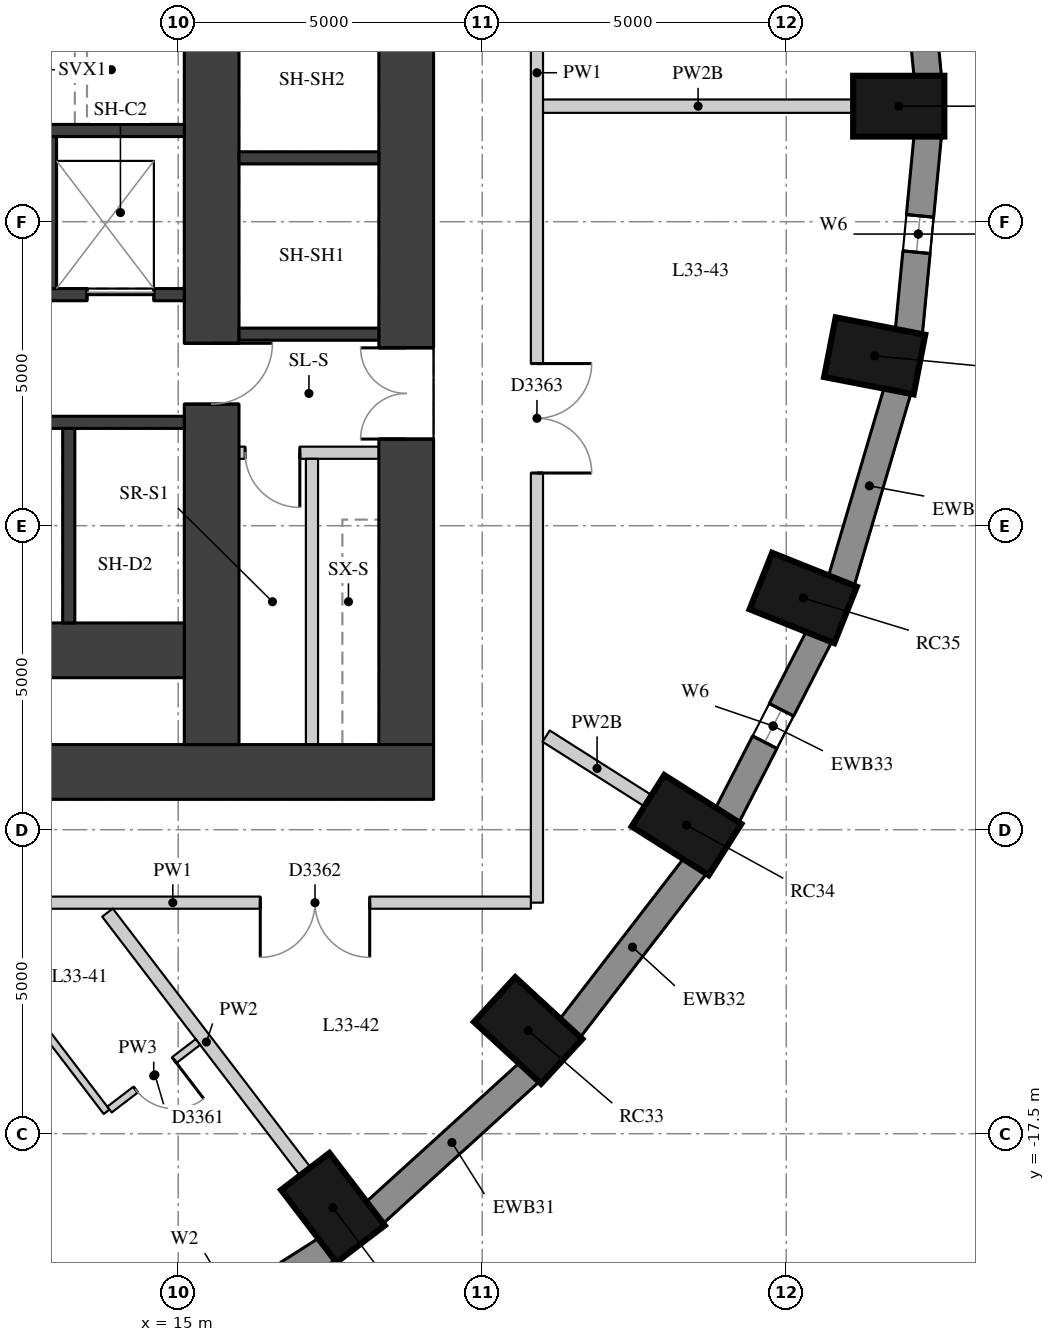
"""IFC4 building model, lengths in metres.
Left out: names, types, materials, properties, quantities, classifications, styles, units other than length and angle.
Written with IfcOpenShell. Run it as: python <this file> out.ifc"""

import sys

from ifc_helpers import new_model, si_unit, direction, frame, frame_2d, origin, origin_2d, place, context, subcontext, project, spatial, rectangle, extrude, element, fill, save


model = new_model("IFC4")
c1 = context("Model", 3, precision=1e-05, world=origin(), true_north=direction((0.0, 1.0)))
c2 = subcontext(c1, "Body", "Model", "MODEL_VIEW")
j1 = project(units=[si_unit("LENGTHUNIT", "METRE"), si_unit("PLANEANGLEUNIT", "RADIAN")], contexts=[c1])
p1 = place(None, origin())
s1 = spatial("IfcSite", under=j1, at=p1, CompositionType="ELEMENT")
p2 = place(p1, origin())
s2 = spatial("IfcBuilding", under=s1, at=p2, CompositionType="ELEMENT")
p3 = place(p2, frame((0.0, 0.0, 118.6)))
s3 = spatial("IfcBuildingStorey", under=s2, at=p3, CompositionType="ELEMENT", Elevation=118.6)
for number, where, z_axis, x_axis in (
    (1, (26.85, -0.6, 0.0), (0.0, 0.0, 1.0), (1.0, 0.0, 0.0)),
    (2, (17.545, -18.717, 0.0), (0.0, 0.0, 1.0), (0.607, -0.795, 0.0)),
    (3, (20.755, -15.802, 0.0), (0.0, 0.0, 1.0), (0.735, -0.678, 0.0)),
    (4, (23.36, -12.425, 0.0), (0.0, 0.0, 1.0), (0.845, -0.536, 0.0)),
    (5, (25.279, -8.689, 0.0), (0.0, 0.0, 1.0), (0.929, -0.371, 0.0)),
    (6, (26.454, -4.707, 0.0), (0.0, 0.0, 1.0), (0.982, -0.19, 0.0)),
):
    element("IfcColumn", number, at=place(p3, frame(where, z_axis=z_axis, x_axis=x_axis)), inside=s3, PredefinedType="COLUMN", context=c2, shape_type="SweptSolid", body=[
        extrude(rectangle(XDim=1.5, YDim=1.0, at=origin_2d()), origin(), (0.0, 0.0, 1.0), 3.3),
    ])
p4 = place(p3, frame((27.328, -0.12, 0.0), z_axis=(0.0, 0.0, 1.0), x_axis=(-0.09589355735, 0.995391594127, 0.0)))
e7 = element("IfcWall", 7, at=p4, inside=s3, PredefinedType="SOLIDWALL", context=c2, shape_type="SweptSolid", body=[
    extrude(rectangle(XDim=3.261, YDim=0.45, at=frame_2d((1.631, 0.0))), origin(), (0.0, 0.0, 1.0), 3.02),
])
p5 = place(p3, frame((14.475, -21.287, 0.0), z_axis=(0.0, 0.0, 1.0), x_axis=(0.843911841423, 0.536481876587, 0.0)))
e8 = element("IfcWall", 8, at=p5, inside=s3, PredefinedType="SOLIDWALL", context=c2, shape_type="SweptSolid", body=[
    extrude(rectangle(XDim=3.532, YDim=0.45, at=frame_2d((1.766, 0.0))), origin(), (0.0, 0.0, 1.0), 3.02),
])
p6 = place(p5, frame((0.766, 0.0, 0.4)))
e9 = element("IfcOpeningElement", 9, at=p6, cuts=e8, PredefinedType="OPENING", context=c2, shape_type="SweptSolid", body=[
    extrude(rectangle(XDim=2.0, YDim=1.75, at=frame_2d((1.0, 0.875))), frame((0.0, 0.235, 0.0), z_axis=(0.0, -1.0, 0.0), x_axis=(1.0, 0.0, 0.0)), (0.0, 0.0, 1.0), 0.47),
])
p7 = place(p3, frame((18.219, -18.81, 0.0), z_axis=(0.0, 0.0, 1.0), x_axis=(0.740364106106, 0.672206062446, 0.0)))
e10 = element("IfcWall", 10, at=p7, inside=s3, PredefinedType="SOLIDWALL", context=c2, shape_type="SweptSolid", body=[
    extrude(rectangle(XDim=3.464, YDim=0.45, at=frame_2d((1.732, 0.0))), origin(), (0.0, 0.0, 1.0), 3.02),
])
p8 = place(p3, frame((21.435, -15.775, 0.0), z_axis=(0.0, 0.0, 1.0), x_axis=(0.610693945156, 0.791866721961, 0.0)))
e11 = element("IfcWall", 11, at=p8, inside=s3, PredefinedType="SOLIDWALL", context=c2, shape_type="SweptSolid", body=[
    extrude(rectangle(XDim=3.395, YDim=0.45, at=frame_2d((1.697, 0.0))), origin(), (0.0, 0.0, 1.0), 3.02),
])
p9 = place(p3, frame((24.023, -12.277, 0.0), z_axis=(0.0, 0.0, 1.0), x_axis=(0.456828186229, 0.889554949549, 0.0)))
e12 = element("IfcWall", 12, at=p9, inside=s3, PredefinedType="SOLIDWALL", context=c2, shape_type="SweptSolid", body=[
    extrude(rectangle(XDim=3.333, YDim=0.45, at=frame_2d((1.667, 0.0))), origin(), (0.0, 0.0, 1.0), 3.02),
])
p10 = place(p9, frame((1.366, 0.0, 0.4)))
e13 = element("IfcOpeningElement", 13, at=p10, cuts=e12, PredefinedType="OPENING", context=c2, shape_type="SweptSolid", body=[
    extrude(rectangle(XDim=0.6, YDim=1.75, at=frame_2d((0.3, 0.875))), frame((0.0, 0.235, 0.0), z_axis=(0.0, -1.0, 0.0), x_axis=(1.0, 0.0, 0.0)), (0.0, 0.0, 1.0), 0.47),
])
p11 = place(p3, frame((25.902, -8.421, 0.0), z_axis=(0.0, 0.0, 1.0), x_axis=(0.282982737009, 0.95912500257, 0.0)))
e14 = element("IfcWall", 14, at=p11, inside=s3, PredefinedType="SOLIDWALL", context=c2, shape_type="SweptSolid", body=[
    extrude(rectangle(XDim=3.286, YDim=0.45, at=frame_2d((1.643, 0.0))), origin(), (0.0, 0.0, 1.0), 3.02),
])
p12 = place(p3, frame((27.015, -4.326, 0.0), z_axis=(0.0, 0.0, 1.0), x_axis=(0.09589355735, 0.995391594127, 0.0)))
e15 = element("IfcWall", 15, at=p12, inside=s3, PredefinedType="SOLIDWALL", context=c2, shape_type="SweptSolid", body=[
    extrude(rectangle(XDim=3.261, YDim=0.45, at=frame_2d((1.631, 0.0))), origin(), (0.0, 0.0, 1.0), 3.02),
])
p13 = place(p12, frame((1.331, 0.0, 0.4)))
e16 = element("IfcOpeningElement", 16, at=p13, cuts=e15, PredefinedType="OPENING", context=c2, shape_type="SweptSolid", body=[
    extrude(rectangle(XDim=0.6, YDim=1.75, at=frame_2d((0.3, 0.875))), frame((0.0, 0.235, 0.0), z_axis=(0.0, -1.0, 0.0), x_axis=(1.0, 0.0, 0.0)), (0.0, 0.0, 1.0), 0.47),
])
p14 = place(p3, frame((18.75, -11.1, 0.0), z_axis=(0.0, 0.0, 1.0), x_axis=(0.0, 1.0, 0.0)))
e17 = element("IfcWall", 17, at=p14, inside=s3, PredefinedType="SHEAR", context=c2, shape_type="SweptSolid", body=[
    extrude(rectangle(XDim=22.2, YDim=0.9, at=frame_2d((11.1, 0.0))), origin(), (0.0, 0.0, 1.0), 3.02),
])
p15 = place(p14, frame((16.175, 0.0, 0.0)))
e18 = element("IfcOpeningElement", 18, at=p15, cuts=e17, PredefinedType="OPENING", context=c2, shape_type="SweptSolid", body=[
    extrude(rectangle(XDim=1.5, YDim=2.1, at=frame_2d((0.75, 1.05))), frame((0.0, 0.46, 0.0), z_axis=(0.0, -1.0, 0.0), x_axis=(1.0, 0.0, 0.0)), (0.0, 0.0, 1.0), 0.92),
])
p16 = place(p14, frame((5.025, 0.0, 0.0)))
e19 = element("IfcOpeningElement", 19, at=p16, cuts=e17, PredefinedType="OPENING", context=c2, shape_type="SweptSolid", body=[
    extrude(rectangle(XDim=1.5, YDim=2.1, at=frame_2d((0.75, 1.05))), frame((0.0, 0.46, 0.0), z_axis=(0.0, -1.0, 0.0), x_axis=(1.0, 0.0, 0.0)), (0.0, 0.0, 1.0), 0.92),
])
p17 = place(p3, frame((4.0, -11.55, 0.0), z_axis=(0.0, 0.0, 1.0), x_axis=(1.0, 0.0, 0.0)))
e20 = element("IfcWall", 20, at=p17, inside=s3, PredefinedType="SHEAR", context=c2, shape_type="SweptSolid", body=[
    extrude(rectangle(XDim=15.2, YDim=0.9, at=frame_2d((7.6, 0.0))), origin(), (0.0, 0.0, 1.0), 3.02),
])
p18 = place(p3, frame((15.55, -11.1, 0.0), z_axis=(0.0, 0.0, 1.0), x_axis=(0.0, 1.0, 0.0)))
e21 = element("IfcWall", 21, at=p18, inside=s3, PredefinedType="SHEAR", context=c2, shape_type="SweptSolid", body=[
    extrude(rectangle(XDim=22.2, YDim=0.9, at=frame_2d((11.1, 0.0))), origin(), (0.0, 0.0, 1.0), 3.02),
])
p19 = place(p18, frame((15.6, 0.0, 0.0)))
e22 = element("IfcOpeningElement", 22, at=p19, cuts=e21, PredefinedType="OPENING", context=c2, shape_type="SweptSolid", body=[
    extrude(rectangle(XDim=1.0, YDim=2.1, at=frame_2d((0.5, 1.05))), frame((0.0, 0.46, 0.0), z_axis=(0.0, -1.0, 0.0), x_axis=(1.0, 0.0, 0.0)), (0.0, 0.0, 1.0), 0.92),
])
p20 = place(p18, frame((5.6, 0.0, 0.0)))
e23 = element("IfcOpeningElement", 23, at=p20, cuts=e21, PredefinedType="OPENING", context=c2, shape_type="SweptSolid", body=[
    extrude(rectangle(XDim=1.0, YDim=2.1, at=frame_2d((0.5, 1.05))), frame((0.0, 0.46, 0.0), z_axis=(0.0, -1.0, 0.0), x_axis=(1.0, 0.0, 0.0)), (0.0, 0.0, 1.0), 0.92),
])
p21 = place(p3, frame((4.9, -9.55, 0.0), z_axis=(0.0, 0.0, 1.0), x_axis=(1.0, 0.0, 0.0)))
e24 = element("IfcWall", 24, at=p21, inside=s3, PredefinedType="SHEAR", context=c2, shape_type="SweptSolid", body=[
    extrude(rectangle(XDim=10.2, YDim=0.9, at=frame_2d((5.1, 0.0))), origin(), (0.0, 0.0, 1.0), 3.02),
])
p22 = place(p3, frame((4.9, -1.0, 0.0), z_axis=(0.0, 0.0, 1.0), x_axis=(1.0, 0.0, 0.0)))
e25 = element("IfcWall", 25, at=p22, inside=s3, PredefinedType="SHEAR", context=c2, shape_type="SweptSolid", body=[
    extrude(rectangle(XDim=10.2, YDim=0.2, at=frame_2d((5.1, 0.0))), origin(), (0.0, 0.0, 1.0), 3.02),
])
p23 = place(p3, frame((4.9, -3.7, 0.0), z_axis=(0.0, 0.0, 1.0), x_axis=(1.0, 0.0, 0.0)))
e26 = element("IfcWall", 26, at=p23, inside=s3, PredefinedType="SHEAR", context=c2, shape_type="SweptSolid", body=[
    extrude(rectangle(XDim=10.2, YDim=0.2, at=frame_2d((5.1, 0.0))), origin(), (0.0, 0.0, 1.0), 3.02),
])
p24 = place(p23, frame((6.3, 0.0, 0.0)))
e27 = element("IfcOpeningElement", 27, at=p24, cuts=e26, PredefinedType="OPENING", context=c2, shape_type="SweptSolid", body=[
    extrude(rectangle(XDim=1.1, YDim=2.1, at=frame_2d((0.55, 1.05))), frame((0.0, 0.11, 0.0), z_axis=(0.0, -1.0, 0.0), x_axis=(1.0, 0.0, 0.0)), (0.0, 0.0, 1.0), 0.22),
])
p25 = place(p23, frame((8.6, 0.0, 0.0)))
e28 = element("IfcOpeningElement", 28, at=p25, cuts=e26, PredefinedType="OPENING", context=c2, shape_type="SweptSolid", body=[
    extrude(rectangle(XDim=1.1, YDim=2.1, at=frame_2d((0.55, 1.05))), frame((0.0, 0.11, 0.0), z_axis=(0.0, -1.0, 0.0), x_axis=(1.0, 0.0, 0.0)), (0.0, 0.0, 1.0), 0.22),
])
p26 = place(p3, frame((4.9, -5.8, 0.0), z_axis=(0.0, 0.0, 1.0), x_axis=(1.0, 0.0, 0.0)))
e29 = element("IfcWall", 29, at=p26, inside=s3, PredefinedType="SHEAR", context=c2, shape_type="SweptSolid", body=[
    extrude(rectangle(XDim=10.2, YDim=0.2, at=frame_2d((5.1, 0.0))), origin(), (0.0, 0.0, 1.0), 3.02),
])
p27 = place(p3, frame((13.2, -9.1, 0.0), z_axis=(0.0, 0.0, 1.0), x_axis=(0.0, 1.0, 0.0)))
e30 = element("IfcWall", 30, at=p27, inside=s3, PredefinedType="SHEAR", context=c2, shape_type="SweptSolid", body=[
    extrude(rectangle(XDim=3.2, YDim=0.2, at=frame_2d((1.6, 0.0))), origin(), (0.0, 0.0, 1.0), 3.02),
])
p28 = place(p3, frame((12.9, -3.6, 0.0), z_axis=(0.0, 0.0, 1.0), x_axis=(0.0, 1.0, 0.0)))
e31 = element("IfcWall", 31, at=p28, inside=s3, PredefinedType="SHEAR", context=c2, shape_type="SweptSolid", body=[
    extrude(rectangle(XDim=2.5, YDim=0.2, at=frame_2d((1.25, 0.0))), origin(), (0.0, 0.0, 1.0), 3.02),
])
for number, where, z_axis, x_axis in (
    (32, (16.0, -4.35, 0.0), (0.0, 0.0, 1.0), (1.0, 0.0, 0.0)),
    (33, (16.0, -1.45, 0.0), (0.0, 0.0, 1.0), (1.0, 0.0, 0.0)),
):
    element("IfcWall", number, at=place(p3, frame(where, z_axis=z_axis, x_axis=x_axis)), inside=s3, PredefinedType="SHEAR", context=c2, shape_type="SweptSolid", body=[
        extrude(rectangle(XDim=2.3, YDim=0.2, at=frame_2d((1.15, 0.0))), origin(), (0.0, 0.0, 1.0), 3.02),
    ])
p29 = place(p3, frame((16.0, -6.3, 0.0), z_axis=(0.0, 0.0, 1.0), x_axis=(1.0, 0.0, 0.0)))
e34 = element("IfcWall", 34, at=p29, inside=s3, PredefinedType="PARTITIONING", context=c2, shape_type="SweptSolid", body=[
    extrude(rectangle(XDim=2.3, YDim=0.2, at=frame_2d((1.15, 0.0))), origin(), (0.0, 0.0, 1.0), 3.02),
])
p30 = place(p29, frame((0.1, 0.0, 0.0)))
e35 = element("IfcOpeningElement", 35, at=p30, cuts=e34, PredefinedType="OPENING", context=c2, shape_type="SweptSolid", body=[
    extrude(rectangle(XDim=0.9, YDim=2.1, at=frame_2d((0.45, 1.05))), frame((0.0, 0.11, 0.0), z_axis=(0.0, -1.0, 0.0), x_axis=(1.0, 0.0, 0.0)), (0.0, 0.0, 1.0), 0.22),
])
p31 = place(p3, frame((17.2, -11.1, 0.0), z_axis=(0.0, 0.0, 1.0), x_axis=(0.0, 1.0, 0.0)))
e36 = element("IfcWall", 36, at=p31, inside=s3, PredefinedType="PARTITIONING", context=c2, shape_type="SweptSolid", body=[
    extrude(rectangle(XDim=4.7, YDim=0.2, at=frame_2d((2.35, 0.0))), origin(), (0.0, 0.0, 1.0), 3.02),
])
p32 = place(p3, frame((20.9, 13.6, 0.0), z_axis=(0.0, 0.0, 1.0), x_axis=(0.0, -1.0, 0.0)))
e37 = element("IfcWall", 37, at=p32, inside=s3, PredefinedType="PARTITIONING", context=c2, shape_type="SweptSolid", body=[
    extrude(rectangle(XDim=27.3, YDim=0.2, at=frame_2d((13.65, 0.0))), origin(), (0.0, 0.0, 1.0), 3.02),
])
p33 = place(p32, frame((18.433, 0.0, 0.0)))
e38 = element("IfcOpeningElement", 38, at=p33, cuts=e37, PredefinedType="OPENING", context=c2, shape_type="SweptSolid", body=[
    extrude(rectangle(XDim=1.8, YDim=2.1, at=frame_2d((0.9, 1.05))), frame((0.0, 0.11, 0.0), z_axis=(0.0, -1.0, 0.0), x_axis=(1.0, 0.0, 0.0)), (0.0, 0.0, 1.0), 0.22),
])
p34 = place(p32, frame((8.167, 0.0, 0.0)))
e39 = element("IfcOpeningElement", 39, at=p34, cuts=e37, PredefinedType="OPENING", context=c2, shape_type="SweptSolid", body=[
    extrude(rectangle(XDim=1.8, YDim=2.1, at=frame_2d((0.9, 1.05))), frame((0.0, 0.11, 0.0), z_axis=(0.0, -1.0, 0.0), x_axis=(1.0, 0.0, 0.0)), (0.0, 0.0, 1.0), 0.22),
])
p35 = place(p3, frame((20.8, -13.7, 0.0), z_axis=(0.0, 0.0, 1.0), x_axis=(-1.0, 0.0, 0.0)))
e40 = element("IfcWall", 40, at=p35, inside=s3, PredefinedType="PARTITIONING", context=c2, shape_type="SweptSolid", body=[
    extrude(rectangle(XDim=11.778, YDim=0.2, at=frame_2d((5.889, 0.0))), origin(), (0.0, 0.0, 1.0), 3.02),
])
p36 = place(p35, frame((2.65, 0.0, 0.0)))
e41 = element("IfcOpeningElement", 41, at=p36, cuts=e40, PredefinedType="OPENING", context=c2, shape_type="SweptSolid", body=[
    extrude(rectangle(XDim=1.8, YDim=2.1, at=frame_2d((0.9, 1.05))), frame((0.0, 0.11, 0.0), z_axis=(0.0, -1.0, 0.0), x_axis=(1.0, 0.0, 0.0)), (0.0, 0.0, 1.0), 0.22),
])
p37 = place(p3, frame((26.1, -0.6, 0.0), z_axis=(0.0, 0.0, 1.0), x_axis=(-1.0, 0.0, 0.0)))
e42 = element("IfcWall", 42, at=p37, inside=s3, PredefinedType="PARTITIONING", context=c2, shape_type="SweptSolid", body=[
    extrude(rectangle(XDim=5.1, YDim=0.22, at=frame_2d((2.55, 0.0))), origin(), (0.0, 0.0, 1.0), 2.57),
])
p38 = place(p3, frame((17.089, -18.121, 0.0), z_axis=(0.0, 0.0, 1.0), x_axis=(-0.607049146133, 0.794664290238, 0.0)))
e43 = element("IfcWall", 43, at=p38, inside=s3, PredefinedType="PARTITIONING", context=c2, shape_type="SweptSolid", body=[
    extrude(rectangle(XDim=5.357, YDim=0.22, at=frame_2d((2.679, 0.0))), origin(), (0.0, 0.0, 1.0), 3.02),
])
p39 = place(p3, frame((22.727, -12.023, 0.0), z_axis=(0.0, 0.0, 1.0), x_axis=(-0.84453164716, 0.535505646044, 0.0)))
e44 = element("IfcWall", 44, at=p39, inside=s3, PredefinedType="PARTITIONING", context=c2, shape_type="SweptSolid", body=[
    extrude(rectangle(XDim=1.985, YDim=0.22, at=frame_2d((0.992, 0.0))), origin(), (0.0, 0.0, 1.0), 2.57),
])
p40 = place(p3, frame((11.296, -13.832, 0.0), z_axis=(0.0, 0.0, 1.0), x_axis=(0.607062475719, -0.794654107505, 0.0)))
e45 = element("IfcWall", 45, at=p40, inside=s3, PredefinedType="PARTITIONING", context=c2, shape_type="SweptSolid", body=[
    extrude(rectangle(XDim=4.162, YDim=0.12, at=frame_2d((2.081, 0.0))), origin(), (0.0, 0.0, 1.0), 3.02),
])
p41 = place(p3, frame((13.87, -17.103, 0.0), z_axis=(0.0, 0.0, 1.0), x_axis=(0.794637937609, 0.607083641776, 0.0)))
e46 = element("IfcWall", 46, at=p41, inside=s3, PredefinedType="PARTITIONING", context=c2, shape_type="SweptSolid", body=[
    extrude(rectangle(XDim=1.83, YDim=0.12, at=frame_2d((0.915, 0.0))), origin(), (0.0, 0.0, 1.0), 3.02),
])
p42 = place(p41, frame((0.54, 0.0, 0.0)))
e47 = element("IfcOpeningElement", 47, at=p42, cuts=e46, PredefinedType="OPENING", context=c2, shape_type="SweptSolid", body=[
    extrude(rectangle(XDim=0.8, YDim=2.1, at=frame_2d((0.4, 1.05))), frame((0.0, 0.07, 0.0), z_axis=(0.0, -1.0, 0.0), x_axis=(1.0, 0.0, 0.0)), (0.0, 0.0, 1.0), 0.14),
])
p43 = place(p10, origin())
e48 = element("IfcWindow", 48, at=p43, inside=s3, PartitioningType="SINGLE_PANEL", PredefinedType="WINDOW", context=c2, shape_type="SweptSolid", body=[
    extrude(rectangle(XDim=0.6, YDim=1.75, at=frame_2d((0.3, 0.875))), frame((0.0, 0.035, 0.0), z_axis=(0.0, -1.0, 0.0), x_axis=(1.0, 0.0, 0.0)), (0.0, 0.0, 1.0), 0.06),
])
fill(e13, e48)
p44 = place(p13, origin())
e49 = element("IfcWindow", 49, at=p44, inside=s3, PartitioningType="SINGLE_PANEL", PredefinedType="WINDOW", context=c2, shape_type="SweptSolid", body=[
    extrude(rectangle(XDim=0.6, YDim=1.75, at=frame_2d((0.3, 0.875))), frame((0.0, 0.035, 0.0), z_axis=(0.0, -1.0, 0.0), x_axis=(1.0, 0.0, 0.0)), (0.0, 0.0, 1.0), 0.06),
])
fill(e16, e49)
p45 = place(p16, origin())
e50 = element("IfcDoor", 50, at=p45, inside=s3, OperationType="DOUBLE_DOOR_SINGLE_SWING", PredefinedType="DOOR", context=c2, shape_type="SweptSolid", body=[
    extrude(rectangle(XDim=1.5, YDim=2.1, at=frame_2d((0.75, 1.05))), frame((0.0, 0.025, 0.0), z_axis=(0.0, -1.0, 0.0), x_axis=(1.0, 0.0, 0.0)), (0.0, 0.0, 1.0), 0.05),
])
fill(e19, e50)
p46 = place(p25, origin())
e51 = element("IfcDoor", 51, at=p46, inside=s3, OperationType="DOUBLE_DOOR_SLIDING", PredefinedType="DOOR", context=c2, shape_type="SweptSolid", body=[
    extrude(rectangle(XDim=1.1, YDim=2.1, at=frame_2d((0.55, 1.05))), frame((0.0, 0.025, 0.0), z_axis=(0.0, -1.0, 0.0), x_axis=(1.0, 0.0, 0.0)), (0.0, 0.0, 1.0), 0.05),
])
fill(e28, e51)
p47 = place(p20, origin())
e52 = element("IfcDoor", 52, at=p47, inside=s3, OperationType="SINGLE_SWING_LEFT", PredefinedType="DOOR", context=c2, shape_type="SweptSolid", body=[
    extrude(rectangle(XDim=1.0, YDim=2.1, at=frame_2d((0.5, 1.05))), frame((0.0, 0.025, 0.0), z_axis=(0.0, -1.0, 0.0), x_axis=(1.0, 0.0, 0.0)), (0.0, 0.0, 1.0), 0.05),
])
fill(e23, e52)
p48 = place(p30, origin())
e53 = element("IfcDoor", 53, at=p48, inside=s3, OperationType="SINGLE_SWING_LEFT", PredefinedType="DOOR", context=c2, shape_type="SweptSolid", body=[
    extrude(rectangle(XDim=0.9, YDim=2.1, at=frame_2d((0.45, 1.05))), frame((0.0, 0.025, 0.0), z_axis=(0.0, -1.0, 0.0), x_axis=(1.0, 0.0, 0.0)), (0.0, 0.0, 1.0), 0.05),
])
fill(e35, e53)
p49 = place(p42, origin())
e54 = element("IfcDoor", 54, at=p49, inside=s3, OperationType="SINGLE_SWING_LEFT", PredefinedType="DOOR", context=c2, shape_type="SweptSolid", body=[
    extrude(rectangle(XDim=0.8, YDim=2.1, at=frame_2d((0.4, 1.05))), frame((0.0, 0.025, 0.0), z_axis=(0.0, -1.0, 0.0), x_axis=(1.0, 0.0, 0.0)), (0.0, 0.0, 1.0), 0.05),
])
fill(e47, e54)
p50 = place(p36, origin())
e55 = element("IfcDoor", 55, at=p50, inside=s3, OperationType="DOUBLE_DOOR_SINGLE_SWING", PredefinedType="DOOR", context=c2, shape_type="SweptSolid", body=[
    extrude(rectangle(XDim=1.8, YDim=2.1, at=frame_2d((0.9, 1.05))), frame((0.0, 0.025, 0.0), z_axis=(0.0, -1.0, 0.0), x_axis=(1.0, 0.0, 0.0)), (0.0, 0.0, 1.0), 0.05),
])
fill(e41, e55)
p51 = place(p33, origin())
e56 = element("IfcDoor", 56, at=p51, inside=s3, OperationType="DOUBLE_DOOR_SINGLE_SWING", PredefinedType="DOOR", context=c2, shape_type="SweptSolid", body=[
    extrude(rectangle(XDim=1.8, YDim=2.1, at=frame_2d((0.9, 1.05))), frame((0.0, 0.025, 0.0), z_axis=(0.0, -1.0, 0.0), x_axis=(1.0, 0.0, 0.0)), (0.0, 0.0, 1.0), 0.05),
])
fill(e38, e56)
save(model, sys.argv[1])
